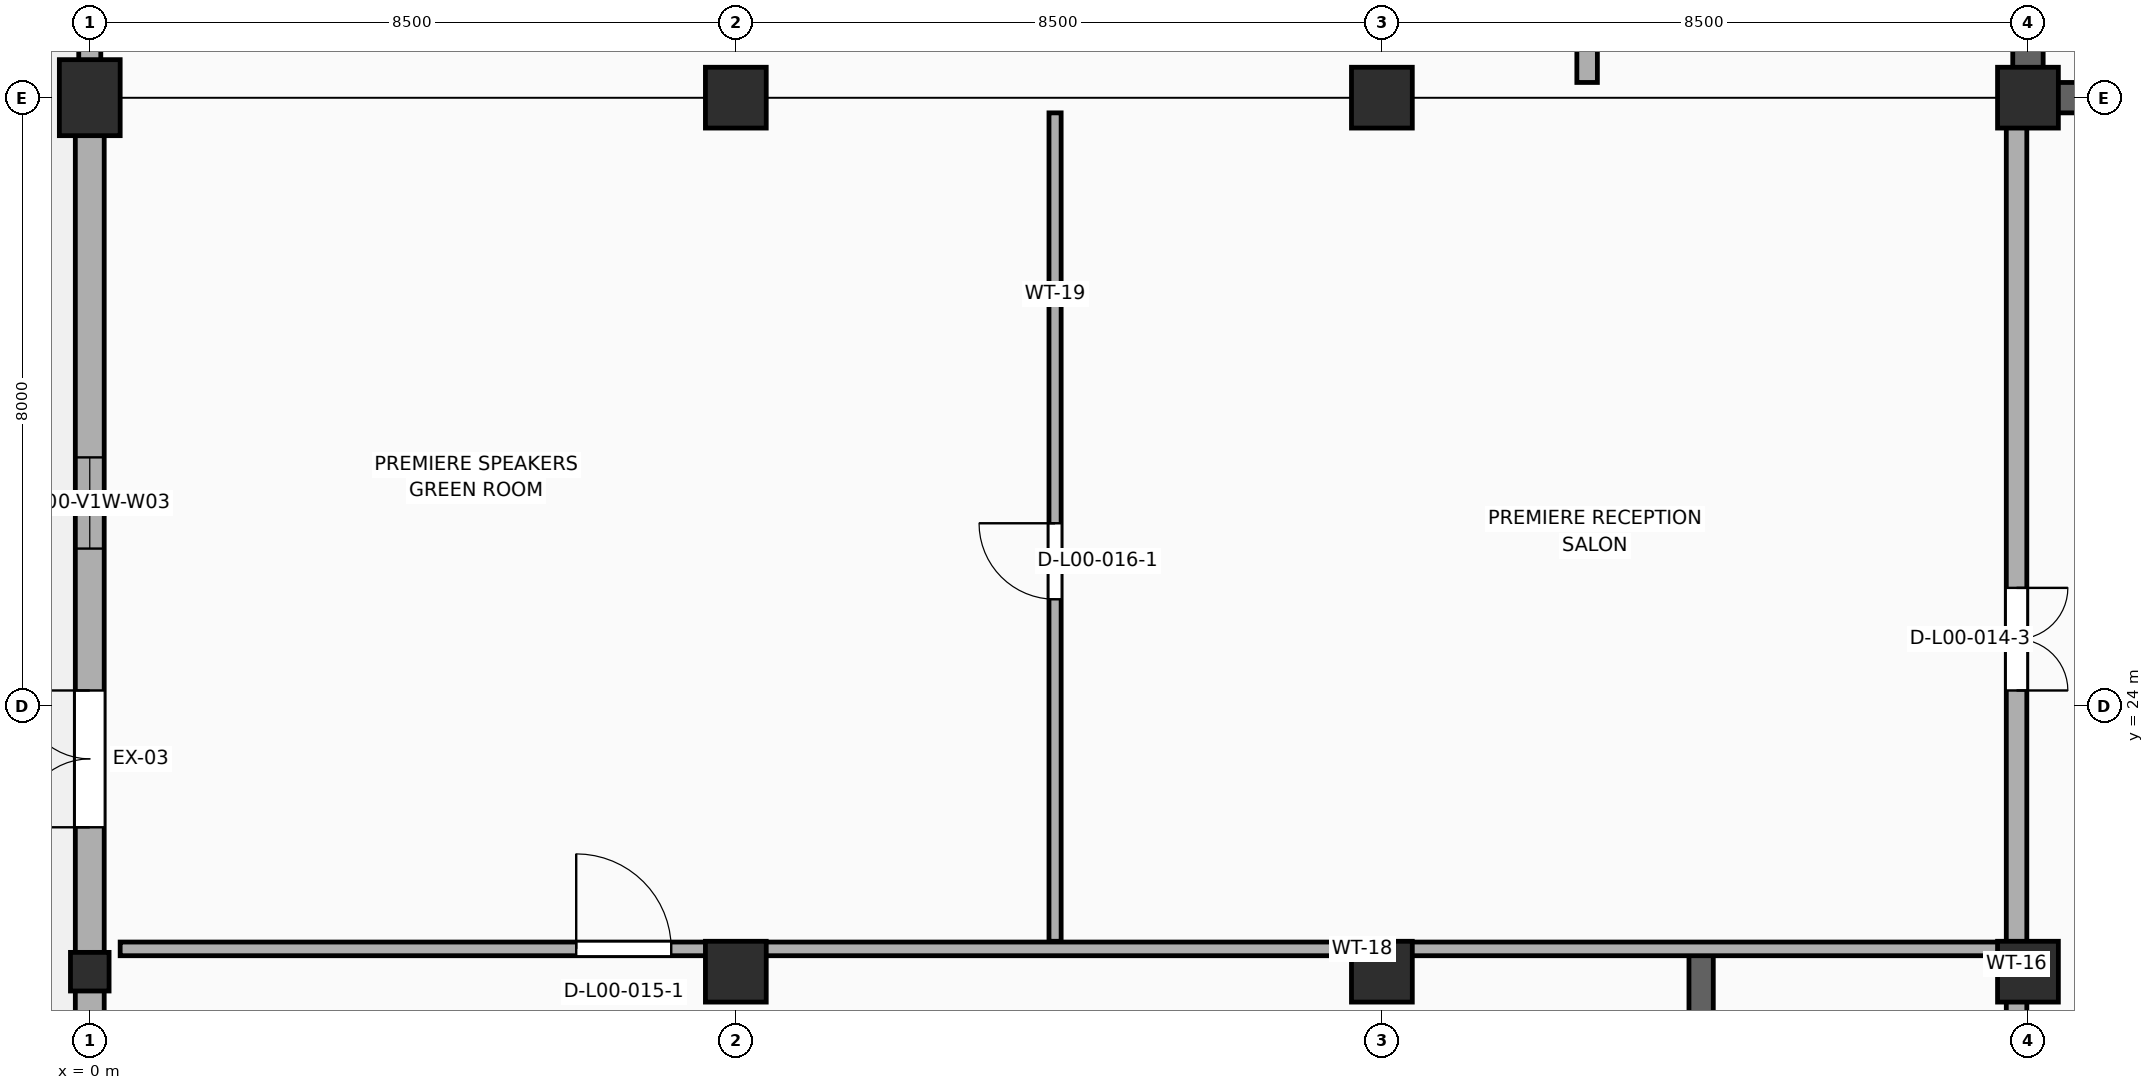
"""IFC4 building model, lengths in metres.
Left out: names, types, materials, properties, quantities, classifications, styles, units other than length and angle.
Written with IfcOpenShell. Run it as: python <this file> out.ifc"""

import sys

from ifc_helpers import new_model, si_unit, direction, frame, frame_2d, origin, origin_2d, place, context, subcontext, project, spatial, rectangle, hollow_circle, extrude, element, fill, save


model = new_model("IFC4")
c1 = context("Model", 3, precision=1e-05, world=origin(), true_north=direction((0.0, 1.0)))
c2 = subcontext(c1, "Body", "Model", "MODEL_VIEW")
j1 = project(units=[si_unit("LENGTHUNIT", "METRE"), si_unit("PLANEANGLEUNIT", "RADIAN")], contexts=[c1])
p1 = place(None, origin())
s1 = spatial("IfcSite", under=j1, at=p1, CompositionType="ELEMENT")
p2 = place(p1, origin())
s2 = spatial("IfcBuilding", under=s1, at=p2, CompositionType="ELEMENT")
p3 = place(p2, origin())
s3 = spatial("IfcBuildingStorey", under=s2, at=p3, CompositionType="ELEMENT", Elevation=0.0)
p4 = place(p3, frame((25.5, 32.0, 0.0), z_axis=(0.0, 0.0, 1.0), x_axis=(0.0, 1.0, 0.0)))
e1 = element("IfcWall", 1, at=p4, inside=s3, PredefinedType="SHEAR", context=c2, shape_type="SweptSolid", body=[
    extrude(rectangle(XDim=12.8, YDim=0.4, at=frame_2d((6.4, 0.0))), origin(), (0.0, 0.0, 1.0), 5.24),
])
p5 = place(p4, frame((1.25, 0.0, 0.0)))
e2 = element("IfcOpeningElement", 2, at=p5, cuts=e1, PredefinedType="OPENING", context=c2, shape_type="SweptSolid", body=[
    extrude(rectangle(XDim=1.05, YDim=2.15, at=frame_2d((0.525, 1.075))), frame((0.0, 0.212, 0.0), z_axis=(0.0, -1.0, 0.0), x_axis=(1.0, 0.0, 0.0)), (0.0, 0.0, 1.0), 0.424),
])
p6 = place(p3, frame((25.7, 32.0, 0.0), z_axis=(0.0, 0.0, 1.0), x_axis=(1.0, 0.0, 0.0)))
e3 = element("IfcWall", 3, at=p6, inside=s3, PredefinedType="SHEAR", context=c2, shape_type="SweptSolid", body=[
    extrude(rectangle(XDim=8.1, YDim=0.4, at=frame_2d((4.05, 0.0))), origin(), (0.0, 0.0, 1.0), 5.24),
])
p7 = place(p3, frame((0.0, 20.5, 0.0), z_axis=(0.0, 0.0, 1.0), x_axis=(1.0, 0.0, 0.0)))
e4 = element("IfcColumn", 4, at=p7, inside=s3, PredefinedType="COLUMN", context=c2, shape_type="SweptSolid", body=[
    extrude(hollow_circle(Radius=0.254, WallThickness=0.016, at=origin_2d()), origin(), (0.0, 0.0, 1.0), 5.14),
])
p8 = place(p3, frame((0.0, 32.0, 0.0), z_axis=(0.0, 0.0, 1.0), x_axis=(1.0, 0.0, 0.0)))
e5 = element("IfcColumn", 5, at=p8, inside=s3, PredefinedType="COLUMN", context=c2, shape_type="SweptSolid", body=[
    extrude(rectangle(XDim=0.8, YDim=1.0, at=origin_2d()), origin(), (0.0, 0.0, 1.0), 5.14),
])
for number, where, z_axis, x_axis in (
    (6, (8.5, 20.5, 0.0), (0.0, 0.0, 1.0), (1.0, 0.0, 0.0)),
    (7, (8.5, 32.0, 0.0), (0.0, 0.0, 1.0), (1.0, 0.0, 0.0)),
    (8, (17.0, 20.5, 0.0), (0.0, 0.0, 1.0), (1.0, 0.0, 0.0)),
    (9, (17.0, 32.0, 0.0), (0.0, 0.0, 1.0), (1.0, 0.0, 0.0)),
    (10, (25.5, 20.5, 0.0), (0.0, 0.0, 1.0), (1.0, 0.0, 0.0)),
    (11, (25.5, 32.0, 0.0), (0.0, 0.0, 1.0), (1.0, 0.0, 0.0)),
):
    element("IfcColumn", number, at=place(p3, frame(where, z_axis=z_axis, x_axis=x_axis)), inside=s3, PredefinedType="COLUMN", context=c2, shape_type="SweptSolid", body=[
        extrude(rectangle(XDim=0.8, YDim=0.8, at=origin_2d()), origin(), (0.0, 0.0, 1.0), 5.14),
    ])
p9 = place(p3, frame((0.0, 0.0, 0.0), z_axis=(0.0, 0.0, 1.0), x_axis=(0.0, 1.0, 0.0)))
e12 = element("IfcWall", 12, at=p9, inside=s3, PredefinedType="STANDARD", context=c2, shape_type="SweptSolid", body=[
    extrude(rectangle(XDim=32.0, YDim=0.38, at=frame_2d((16.0, 0.0))), origin(), (0.0, 0.0, 1.0), 4.43),
])
p10 = place(p9, frame((22.4, 0.0, 0.0)))
e13 = element("IfcOpeningElement", 13, at=p10, cuts=e12, PredefinedType="OPENING", context=c2, shape_type="SweptSolid", body=[
    extrude(rectangle(XDim=1.8, YDim=2.3, at=frame_2d((0.9, 1.15))), frame((0.0, 0.202, 0.0), z_axis=(0.0, -1.0, 0.0), x_axis=(1.0, 0.0, 0.0)), (0.0, 0.0, 1.0), 0.404),
])
p11 = place(p9, frame((4.733, 0.0, 1.2)))
e14 = element("IfcOpeningElement", 14, at=p11, cuts=e12, PredefinedType="OPENING", context=c2, shape_type="SweptSolid", body=[
    extrude(rectangle(XDim=1.2, YDim=2.2, at=frame_2d((0.6, 1.1))), frame((0.0, 0.202, 0.0), z_axis=(0.0, -1.0, 0.0), x_axis=(1.0, 0.0, 0.0)), (0.0, 0.0, 1.0), 0.404),
])
p12 = place(p9, frame((15.4, 0.0, 1.2)))
e15 = element("IfcOpeningElement", 15, at=p12, cuts=e12, PredefinedType="OPENING", context=c2, shape_type="SweptSolid", body=[
    extrude(rectangle(XDim=1.2, YDim=2.2, at=frame_2d((0.6, 1.1))), frame((0.0, 0.202, 0.0), z_axis=(0.0, -1.0, 0.0), x_axis=(1.0, 0.0, 0.0)), (0.0, 0.0, 1.0), 0.404),
])
p13 = place(p9, frame((26.067, 0.0, 1.2)))
e16 = element("IfcOpeningElement", 16, at=p13, cuts=e12, PredefinedType="OPENING", context=c2, shape_type="SweptSolid", body=[
    extrude(rectangle(XDim=1.2, YDim=2.2, at=frame_2d((0.6, 1.1))), frame((0.0, 0.202, 0.0), z_axis=(0.0, -1.0, 0.0), x_axis=(1.0, 0.0, 0.0)), (0.0, 0.0, 1.0), 0.404),
])
p14 = place(p3, frame((0.0, 32.0, 0.0), z_axis=(0.0, 0.0, 1.0), x_axis=(0.0, 1.0, 0.0)))
e17 = element("IfcWall", 17, at=p14, inside=s3, PredefinedType="STANDARD", context=c2, shape_type="SweptSolid", body=[
    extrude(rectangle(XDim=48.5, YDim=0.29, at=frame_2d((24.25, 0.0))), origin(), (0.0, 0.0, 1.0), 4.28),
])
p15 = place(p14, frame((6.2, 0.0, 0.0)))
e18 = element("IfcOpeningElement", 18, at=p15, cuts=e17, PredefinedType="OPENING", context=c2, shape_type="SweptSolid", body=[
    extrude(rectangle(XDim=1.8, YDim=2.3, at=frame_2d((0.9, 1.15))), frame((0.0, 0.157, 0.0), z_axis=(0.0, -1.0, 0.0), x_axis=(1.0, 0.0, 0.0)), (0.0, 0.0, 1.0), 0.314),
])
p16 = place(p14, frame((38.2, 0.0, 0.0)))
e19 = element("IfcOpeningElement", 19, at=p16, cuts=e17, PredefinedType="OPENING", context=c2, shape_type="SweptSolid", body=[
    extrude(rectangle(XDim=1.8, YDim=2.3, at=frame_2d((0.9, 1.15))), frame((0.0, 0.157, 0.0), z_axis=(0.0, -1.0, 0.0), x_axis=(1.0, 0.0, 0.0)), (0.0, 0.0, 1.0), 0.314),
])
p17 = place(p14, frame((32.83, 0.0, 2.72)))
e20 = element("IfcOpeningElement", 20, at=p17, cuts=e17, PredefinedType="OPENING", context=c2, shape_type="SweptSolid", body=[
    extrude(rectangle(XDim=3.0, YDim=1.4, at=frame_2d((1.5, 0.7))), frame((0.0, 0.157, 0.0), z_axis=(0.0, -1.0, 0.0), x_axis=(1.0, 0.0, 0.0)), (0.0, 0.0, 1.0), 0.314),
])
p18 = place(p14, frame((42.15, 0.0, 2.72)))
e21 = element("IfcOpeningElement", 21, at=p18, cuts=e17, PredefinedType="OPENING", context=c2, shape_type="SweptSolid", body=[
    extrude(rectangle(XDim=3.0, YDim=1.4, at=frame_2d((1.5, 0.7))), frame((0.0, 0.157, 0.0), z_axis=(0.0, -1.0, 0.0), x_axis=(1.0, 0.0, 0.0)), (0.0, 0.0, 1.0), 0.314),
])
p19 = place(p3, frame((21.2, 3.2, 0.0), z_axis=(0.0, 0.0, 1.0), x_axis=(0.0, 1.0, 0.0)))
e22 = element("IfcWall", 22, at=p19, inside=s3, PredefinedType="SHEAR", context=c2, shape_type="SweptSolid", body=[
    extrude(rectangle(XDim=17.6, YDim=0.32, at=frame_2d((8.8, 0.0))), origin(), (0.0, 0.0, 1.0), 5.1),
])
p20 = place(p19, frame((4.0, 0.0, 0.0)))
e23 = element("IfcOpeningElement", 23, at=p20, cuts=e22, PredefinedType="OPENING", context=c2, shape_type="SweptSolid", body=[
    extrude(rectangle(XDim=1.8, YDim=2.4, at=frame_2d((0.9, 1.2))), frame((0.0, 0.172, 0.0), z_axis=(0.0, -1.0, 0.0), x_axis=(1.0, 0.0, 0.0)), (0.0, 0.0, 1.0), 0.344),
])
p21 = place(p19, frame((12.0, 0.0, 0.0)))
e24 = element("IfcOpeningElement", 24, at=p21, cuts=e22, PredefinedType="OPENING", context=c2, shape_type="SweptSolid", body=[
    extrude(rectangle(XDim=1.8, YDim=2.4, at=frame_2d((0.9, 1.2))), frame((0.0, 0.172, 0.0), z_axis=(0.0, -1.0, 0.0), x_axis=(1.0, 0.0, 0.0)), (0.0, 0.0, 1.0), 0.344),
])
p22 = place(p3, frame((25.35, 3.2, 0.0), z_axis=(0.0, 0.0, 1.0), x_axis=(0.0, 1.0, 0.0)))
e25 = element("IfcWall", 25, at=p22, inside=s3, PredefinedType="PARTITIONING", context=c2, shape_type="SweptSolid", body=[
    extrude(rectangle(XDim=28.6, YDim=0.27, at=frame_2d((14.3, 0.0))), origin(), (0.0, 0.0, 1.0), 4.03),
])
p23 = place(p22, frame((4.0, 0.0, 0.0)))
e26 = element("IfcOpeningElement", 26, at=p23, cuts=e25, PredefinedType="OPENING", context=c2, shape_type="SweptSolid", body=[
    extrude(rectangle(XDim=1.8, YDim=2.4, at=frame_2d((0.9, 1.2))), frame((0.0, 0.147, 0.0), z_axis=(0.0, -1.0, 0.0), x_axis=(1.0, 0.0, 0.0)), (0.0, 0.0, 1.0), 0.294),
])
p24 = place(p22, frame((12.0, 0.0, 0.0)))
e27 = element("IfcOpeningElement", 27, at=p24, cuts=e25, PredefinedType="OPENING", context=c2, shape_type="SweptSolid", body=[
    extrude(rectangle(XDim=1.8, YDim=2.4, at=frame_2d((0.9, 1.2))), frame((0.0, 0.147, 0.0), z_axis=(0.0, -1.0, 0.0), x_axis=(1.0, 0.0, 0.0)), (0.0, 0.0, 1.0), 0.294),
])
p25 = place(p22, frame((21.0, 0.0, 0.0)))
e28 = element("IfcOpeningElement", 28, at=p25, cuts=e25, PredefinedType="OPENING", context=c2, shape_type="SweptSolid", body=[
    extrude(rectangle(XDim=1.35, YDim=2.25, at=frame_2d((0.675, 1.125))), frame((0.0, 0.147, 0.0), z_axis=(0.0, -1.0, 0.0), x_axis=(1.0, 0.0, 0.0)), (0.0, 0.0, 1.0), 0.294),
])
p26 = place(p3, frame((0.4, 20.8, 0.0), z_axis=(0.0, 0.0, 1.0), x_axis=(1.0, 0.0, 0.0)))
e29 = element("IfcWall", 29, at=p26, inside=s3, PredefinedType="PARTITIONING", context=c2, shape_type="SweptSolid", body=[
    extrude(rectangle(XDim=24.8, YDim=0.18, at=frame_2d((12.4, 0.0))), origin(), (0.0, 0.0, 1.0), 4.18),
])
p27 = place(p26, frame((6.0, 0.0, 0.0)))
e30 = element("IfcOpeningElement", 30, at=p27, cuts=e29, PredefinedType="OPENING", context=c2, shape_type="SweptSolid", body=[
    extrude(rectangle(XDim=1.25, YDim=2.25, at=frame_2d((0.625, 1.125))), frame((0.0, 0.102, 0.0), z_axis=(0.0, -1.0, 0.0), x_axis=(1.0, 0.0, 0.0)), (0.0, 0.0, 1.0), 0.204),
])
p28 = place(p3, frame((12.7, 20.9, 0.0), z_axis=(0.0, 0.0, 1.0), x_axis=(0.0, 1.0, 0.0)))
e31 = element("IfcWall", 31, at=p28, inside=s3, PredefinedType="PARTITIONING", context=c2, shape_type="SweptSolid", body=[
    extrude(rectangle(XDim=10.9, YDim=0.16, at=frame_2d((5.45, 0.0))), origin(), (0.0, 0.0, 1.0), 4.33),
])
p29 = place(p28, frame((4.5, 0.0, 0.0)))
e32 = element("IfcOpeningElement", 32, at=p29, cuts=e31, PredefinedType="OPENING", context=c2, shape_type="SweptSolid", body=[
    extrude(rectangle(XDim=1.0, YDim=2.15, at=frame_2d((0.5, 1.075))), frame((0.0, 0.092, 0.0), z_axis=(0.0, -1.0, 0.0), x_axis=(1.0, 0.0, 0.0)), (0.0, 0.0, 1.0), 0.184),
])
p30 = place(p3, frame((19.7, 32.2, 0.0), z_axis=(0.0, 0.0, 1.0), x_axis=(0.0, 1.0, 0.0)))
e33 = element("IfcWall", 33, at=p30, inside=s3, PredefinedType="PARTITIONING", context=c2, shape_type="SweptSolid", body=[
    extrude(rectangle(XDim=48.0, YDim=0.27, at=frame_2d((24.0, 0.0))), origin(), (0.0, 0.0, 1.0), 4.23),
])
p31 = place(p30, frame((6.5, 0.0, 0.0)))
e34 = element("IfcOpeningElement", 34, at=p31, cuts=e33, PredefinedType="OPENING", context=c2, shape_type="SweptSolid", body=[
    extrude(rectangle(XDim=1.8, YDim=2.4, at=frame_2d((0.9, 1.2))), frame((0.0, 0.147, 0.0), z_axis=(0.0, -1.0, 0.0), x_axis=(1.0, 0.0, 0.0)), (0.0, 0.0, 1.0), 0.294),
])
p32 = place(p30, frame((22.5, 0.0, 0.0)))
e35 = element("IfcOpeningElement", 35, at=p32, cuts=e33, PredefinedType="OPENING", context=c2, shape_type="SweptSolid", body=[
    extrude(rectangle(XDim=1.8, YDim=2.4, at=frame_2d((0.9, 1.2))), frame((0.0, 0.147, 0.0), z_axis=(0.0, -1.0, 0.0), x_axis=(1.0, 0.0, 0.0)), (0.0, 0.0, 1.0), 0.294),
])
p33 = place(p30, frame((38.5, 0.0, 0.0)))
e36 = element("IfcOpeningElement", 36, at=p33, cuts=e33, PredefinedType="OPENING", context=c2, shape_type="SweptSolid", body=[
    extrude(rectangle(XDim=1.8, YDim=2.4, at=frame_2d((0.9, 1.2))), frame((0.0, 0.147, 0.0), z_axis=(0.0, -1.0, 0.0), x_axis=(1.0, 0.0, 0.0)), (0.0, 0.0, 1.0), 0.294),
])
p34 = place(p10, origin())
e37 = element("IfcDoor", 37, at=p34, inside=s3, OperationType="DOUBLE_DOOR_SINGLE_SWING", PredefinedType="DOOR", context=c2, shape_type="SweptSolid", body=[
    extrude(rectangle(XDim=1.8, YDim=2.3, at=frame_2d((0.9, 1.15))), frame((0.0, 0.025, 0.0), z_axis=(0.0, -1.0, 0.0), x_axis=(1.0, 0.0, 0.0)), (0.0, 0.0, 1.0), 0.05),
])
fill(e13, e37)
p35 = place(p13, origin())
e38 = element("IfcWindow", 38, at=p35, inside=s3, PartitioningType="SINGLE_PANEL", PredefinedType="WINDOW", context=c2, shape_type="SweptSolid", body=[
    extrude(rectangle(XDim=1.2, YDim=2.2, at=frame_2d((0.6, 1.1))), frame((0.0, 0.03, 0.0), z_axis=(0.0, -1.0, 0.0), x_axis=(1.0, 0.0, 0.0)), (0.0, 0.0, 1.0), 0.06),
])
fill(e16, e38)
p36 = place(p25, frame((1.35, 0.0, 0.0), z_axis=(0.0, 0.0, 1.0), x_axis=(-1.0, 0.0, 0.0)))
e39 = element("IfcDoor", 39, at=p36, inside=s3, OperationType="DOUBLE_DOOR_SINGLE_SWING", PredefinedType="DOOR", context=c2, shape_type="SweptSolid", body=[
    extrude(rectangle(XDim=1.35, YDim=2.25, at=frame_2d((0.675, 1.125))), frame((0.0, 0.025, 0.0), z_axis=(0.0, -1.0, 0.0), x_axis=(1.0, 0.0, 0.0)), (0.0, 0.0, 1.0), 0.05),
])
fill(e28, e39)
p37 = place(p27, origin())
e40 = element("IfcDoor", 40, at=p37, inside=s3, OperationType="SINGLE_SWING_LEFT", PredefinedType="DOOR", context=c2, shape_type="SweptSolid", body=[
    extrude(rectangle(XDim=1.25, YDim=2.25, at=frame_2d((0.625, 1.125))), frame((0.0, 0.025, 0.0), z_axis=(0.0, -1.0, 0.0), x_axis=(1.0, 0.0, 0.0)), (0.0, 0.0, 1.0), 0.05),
])
fill(e30, e40)
p38 = place(p29, origin())
e41 = element("IfcDoor", 41, at=p38, inside=s3, OperationType="SINGLE_SWING_RIGHT", PredefinedType="DOOR", context=c2, shape_type="SweptSolid", body=[
    extrude(rectangle(XDim=1.0, YDim=2.15, at=frame_2d((0.5, 1.075))), frame((0.0, 0.025, 0.0), z_axis=(0.0, -1.0, 0.0), x_axis=(1.0, 0.0, 0.0)), (0.0, 0.0, 1.0), 0.05),
])
fill(e32, e41)
save(model, sys.argv[1])
